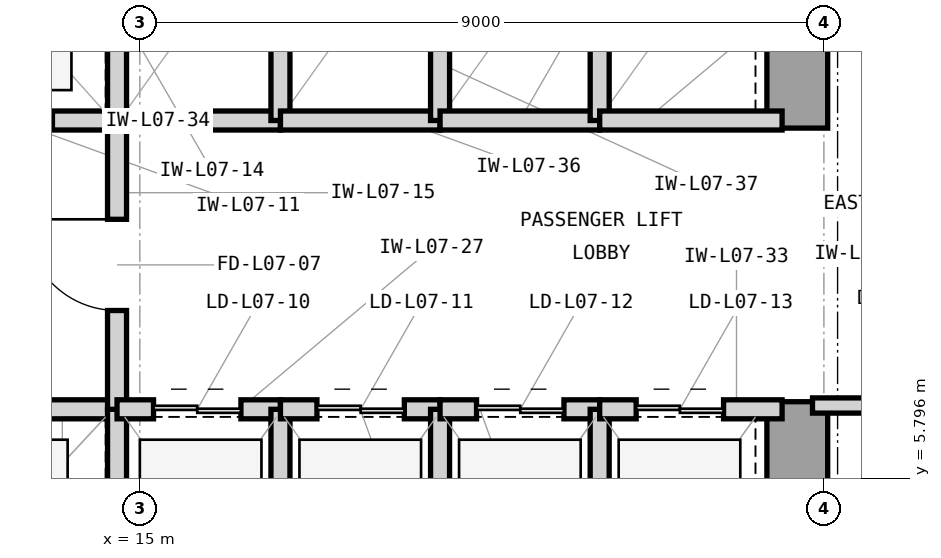
"""IFC4 building model, lengths in metres.
Left out: names, types, materials, properties, quantities, classifications, styles, units other than length and angle.
Written with IfcOpenShell. Run it as: python <this file> out.ifc"""

import sys

from ifc_helpers import new_model, si_unit, direction, frame, frame_2d, origin, place, context, subcontext, project, spatial, rectangle, extrude, element, fill, save


model = new_model("IFC4")
c1 = context("Model", 3, precision=1e-05, world=origin(), true_north=direction((0.0, 1.0)))
c2 = subcontext(c1, "Body", "Model", "MODEL_VIEW")
j1 = project(units=[si_unit("LENGTHUNIT", "METRE"), si_unit("PLANEANGLEUNIT", "RADIAN")], contexts=[c1])
p1 = place(None, origin())
s1 = spatial("IfcSite", under=j1, at=p1, CompositionType="ELEMENT")
p2 = place(p1, origin())
s2 = spatial("IfcBuilding", under=s1, at=p2, CompositionType="ELEMENT")
p3 = place(p2, frame((0.0, 0.0, 34.2)))
s3 = spatial("IfcBuildingStorey", under=s2, at=p3, CompositionType="ELEMENT", Elevation=34.2)
p4 = place(p3, frame((23.65, 3.75, 0.0), z_axis=(0.0, 0.0, 1.0), x_axis=(0.0, 1.0, 0.0)))
e1 = element("IfcWall", 1, at=p4, inside=s3, PredefinedType="SHEAR", context=c2, shape_type="SweptSolid", body=[
    extrude(rectangle(XDim=3.05, YDim=0.8, at=frame_2d((1.525, 0.0))), origin(), (0.0, 0.0, 1.0), 4.2),
])
p5 = place(p3, frame((23.65, 10.4, 0.0), z_axis=(0.0, 0.0, 1.0), x_axis=(0.0, 1.0, 0.0)))
e2 = element("IfcWall", 2, at=p5, inside=s3, PredefinedType="SHEAR", context=c2, shape_type="SweptSolid", body=[
    extrude(rectangle(XDim=3.2, YDim=0.8, at=frame_2d((1.6, 0.0))), origin(), (0.0, 0.0, 1.0), 4.2),
])
p6 = place(p3, frame((11.82, 6.7, 0.0), z_axis=(0.0, 0.0, 1.0), x_axis=(1.0, 0.0, 0.0)))
e3 = element("IfcWall", 3, at=p6, inside=s3, PredefinedType="PARTITIONING", context=c2, shape_type="SweptSolid", body=[
    extrude(rectangle(XDim=2.88, YDim=0.25, at=frame_2d((1.44, 0.0))), origin(), (0.0, 0.0, 1.0), 3.426),
])
p7 = place(p6, frame((0.85, 0.0, 0.0)))
e4 = element("IfcOpeningElement", 4, at=p7, cuts=e3, PredefinedType="OPENING", context=c2, shape_type="SweptSolid", body=[
    extrude(rectangle(XDim=1.1, YDim=2.25, at=frame_2d((0.55, 1.125))), frame((0.0, 0.135, 0.0), z_axis=(0.0, -1.0, 0.0), x_axis=(1.0, 0.0, 0.0)), (0.0, 0.0, 1.0), 0.27),
])
p8 = place(p3, frame((14.7, 3.35, 0.0), z_axis=(0.0, 0.0, 1.0), x_axis=(0.0, 1.0, 0.0)))
e5 = element("IfcWall", 5, at=p8, inside=s3, PredefinedType="PARTITIONING", context=c2, shape_type="SweptSolid", body=[
    extrude(rectangle(XDim=3.35, YDim=0.25, at=frame_2d((1.675, 0.0))), origin(), (0.0, 0.0, 1.0), 3.97),
])
p9 = place(p3, frame((11.95, 10.5, 0.0), z_axis=(0.0, 0.0, 1.0), x_axis=(1.0, 0.0, 0.0)))
e6 = element("IfcWall", 6, at=p9, inside=s3, PredefinedType="PARTITIONING", context=c2, shape_type="SweptSolid", body=[
    extrude(rectangle(XDim=2.75, YDim=0.25, at=frame_2d((1.375, 0.0))), origin(), (0.0, 0.0, 1.0), 3.426),
])
p10 = place(p9, frame((0.8, 0.0, 0.0)))
e7 = element("IfcOpeningElement", 7, at=p10, cuts=e6, PredefinedType="OPENING", context=c2, shape_type="SweptSolid", body=[
    extrude(rectangle(XDim=1.1, YDim=2.25, at=frame_2d((0.55, 1.125))), frame((0.0, 0.135, 0.0), z_axis=(0.0, -1.0, 0.0), x_axis=(1.0, 0.0, 0.0)), (0.0, 0.0, 1.0), 0.27),
])
p11 = place(p3, frame((14.7, 10.5, 0.0), z_axis=(0.0, 0.0, 1.0), x_axis=(0.0, 1.0, 0.0)))
e8 = element("IfcWall", 8, at=p11, inside=s3, PredefinedType="PARTITIONING", context=c2, shape_type="SweptSolid", body=[
    extrude(rectangle(XDim=3.0, YDim=0.25, at=frame_2d((1.5, 0.0))), origin(), (0.0, 0.0, 1.0), 3.97),
])
p12 = place(p3, frame((14.7, 6.7, 0.0), z_axis=(0.0, 0.0, 1.0), x_axis=(0.0, 1.0, 0.0)))
e9 = element("IfcWall", 9, at=p12, inside=s3, PredefinedType="PARTITIONING", context=c2, shape_type="SweptSolid", body=[
    extrude(rectangle(XDim=3.8, YDim=0.25, at=frame_2d((1.9, 0.0))), origin(), (0.0, 0.0, 1.0), 3.97),
])
p13 = place(p12, frame((1.3, 0.0, 0.0)))
e10 = element("IfcOpeningElement", 10, at=p13, cuts=e9, PredefinedType="OPENING", context=c2, shape_type="SweptSolid", body=[
    extrude(rectangle(XDim=1.2, YDim=2.2, at=frame_2d((0.6, 1.1))), frame((0.0, 0.135, 0.0), z_axis=(0.0, -1.0, 0.0), x_axis=(1.0, 0.0, 0.0)), (0.0, 0.0, 1.0), 0.27),
])
p14 = place(p3, frame((14.7, 6.7, 0.0), z_axis=(0.0, 0.0, 1.0), x_axis=(1.0, 0.0, 0.0)))
e11 = element("IfcWall", 11, at=p14, inside=s3, PredefinedType="PARTITIONING", context=c2, shape_type="SweptSolid", body=[
    extrude(rectangle(XDim=2.15, YDim=0.25, at=frame_2d((1.075, 0.0))), origin(), (0.0, 0.0, 1.0), 3.426),
])
p15 = place(p14, frame((0.48, 0.0, 0.0)))
e12 = element("IfcOpeningElement", 12, at=p15, cuts=e11, PredefinedType="OPENING", context=c2, shape_type="SweptSolid", body=[
    extrude(rectangle(XDim=1.15, YDim=2.25, at=frame_2d((0.575, 1.125))), frame((0.0, 0.135, 0.0), z_axis=(0.0, -1.0, 0.0), x_axis=(1.0, 0.0, 0.0)), (0.0, 0.0, 1.0), 0.27),
])
p16 = place(p3, frame((16.85, 3.35, 0.0), z_axis=(0.0, 0.0, 1.0), x_axis=(0.0, 1.0, 0.0)))
e13 = element("IfcWall", 13, at=p16, inside=s3, PredefinedType="PARTITIONING", context=c2, shape_type="SweptSolid", body=[
    extrude(rectangle(XDim=3.35, YDim=0.25, at=frame_2d((1.675, 0.0))), origin(), (0.0, 0.0, 1.0), 3.97),
])
p17 = place(p3, frame((16.85, 6.7, 0.0), z_axis=(0.0, 0.0, 1.0), x_axis=(1.0, 0.0, 0.0)))
e14 = element("IfcWall", 14, at=p17, inside=s3, PredefinedType="PARTITIONING", context=c2, shape_type="SweptSolid", body=[
    extrude(rectangle(XDim=2.1, YDim=0.25, at=frame_2d((1.05, 0.0))), origin(), (0.0, 0.0, 1.0), 3.426),
])
p18 = place(p17, frame((0.48, 0.0, 0.0)))
e15 = element("IfcOpeningElement", 15, at=p18, cuts=e14, PredefinedType="OPENING", context=c2, shape_type="SweptSolid", body=[
    extrude(rectangle(XDim=1.15, YDim=2.25, at=frame_2d((0.575, 1.125))), frame((0.0, 0.135, 0.0), z_axis=(0.0, -1.0, 0.0), x_axis=(1.0, 0.0, 0.0)), (0.0, 0.0, 1.0), 0.27),
])
p19 = place(p3, frame((18.95, 3.35, 0.0), z_axis=(0.0, 0.0, 1.0), x_axis=(0.0, 1.0, 0.0)))
e16 = element("IfcWall", 16, at=p19, inside=s3, PredefinedType="PARTITIONING", context=c2, shape_type="SweptSolid", body=[
    extrude(rectangle(XDim=3.35, YDim=0.25, at=frame_2d((1.675, 0.0))), origin(), (0.0, 0.0, 1.0), 3.97),
])
p20 = place(p3, frame((18.95, 6.7, 0.0), z_axis=(0.0, 0.0, 1.0), x_axis=(1.0, 0.0, 0.0)))
e17 = element("IfcWall", 17, at=p20, inside=s3, PredefinedType="PARTITIONING", context=c2, shape_type="SweptSolid", body=[
    extrude(rectangle(XDim=2.1, YDim=0.25, at=frame_2d((1.05, 0.0))), origin(), (0.0, 0.0, 1.0), 3.426),
])
p21 = place(p20, frame((0.48, 0.0, 0.0)))
e18 = element("IfcOpeningElement", 18, at=p21, cuts=e17, PredefinedType="OPENING", context=c2, shape_type="SweptSolid", body=[
    extrude(rectangle(XDim=1.15, YDim=2.25, at=frame_2d((0.575, 1.125))), frame((0.0, 0.135, 0.0), z_axis=(0.0, -1.0, 0.0), x_axis=(1.0, 0.0, 0.0)), (0.0, 0.0, 1.0), 0.27),
])
p22 = place(p3, frame((21.05, 3.35, 0.0), z_axis=(0.0, 0.0, 1.0), x_axis=(0.0, 1.0, 0.0)))
e19 = element("IfcWall", 19, at=p22, inside=s3, PredefinedType="PARTITIONING", context=c2, shape_type="SweptSolid", body=[
    extrude(rectangle(XDim=3.35, YDim=0.25, at=frame_2d((1.675, 0.0))), origin(), (0.0, 0.0, 1.0), 3.97),
])
p23 = place(p3, frame((21.05, 6.7, 0.0), z_axis=(0.0, 0.0, 1.0), x_axis=(1.0, 0.0, 0.0)))
e20 = element("IfcWall", 20, at=p23, inside=s3, PredefinedType="PARTITIONING", context=c2, shape_type="SweptSolid", body=[
    extrude(rectangle(XDim=2.4, YDim=0.25, at=frame_2d((1.2, 0.0))), origin(), (0.0, 0.0, 1.0), 3.426),
])
p24 = place(p23, frame((0.48, 0.0, 0.0)))
e21 = element("IfcOpeningElement", 21, at=p24, cuts=e20, PredefinedType="OPENING", context=c2, shape_type="SweptSolid", body=[
    extrude(rectangle(XDim=1.15, YDim=2.25, at=frame_2d((0.575, 1.125))), frame((0.0, 0.135, 0.0), z_axis=(0.0, -1.0, 0.0), x_axis=(1.0, 0.0, 0.0)), (0.0, 0.0, 1.0), 0.27),
])
p25 = place(p3, frame((14.7, 10.5, 0.0), z_axis=(0.0, 0.0, 1.0), x_axis=(1.0, 0.0, 0.0)))
e22 = element("IfcWall", 22, at=p25, inside=s3, PredefinedType="PARTITIONING", context=c2, shape_type="SweptSolid", body=[
    extrude(rectangle(XDim=2.15, YDim=0.25, at=frame_2d((1.075, 0.0))), origin(), (0.0, 0.0, 1.0), 3.426),
])
p26 = place(p3, frame((16.85, 10.5, 0.0), z_axis=(0.0, 0.0, 1.0), x_axis=(0.0, 1.0, 0.0)))
e23 = element("IfcWall", 23, at=p26, inside=s3, PredefinedType="PARTITIONING", context=c2, shape_type="SweptSolid", body=[
    extrude(rectangle(XDim=3.0, YDim=0.25, at=frame_2d((1.5, 0.0))), origin(), (0.0, 0.0, 1.0), 3.97),
])
p27 = place(p3, frame((16.85, 10.5, 0.0), z_axis=(0.0, 0.0, 1.0), x_axis=(1.0, 0.0, 0.0)))
e24 = element("IfcWall", 24, at=p27, inside=s3, PredefinedType="PARTITIONING", context=c2, shape_type="SweptSolid", body=[
    extrude(rectangle(XDim=2.1, YDim=0.25, at=frame_2d((1.05, 0.0))), origin(), (0.0, 0.0, 1.0), 3.426),
])
p28 = place(p3, frame((18.95, 10.5, 0.0), z_axis=(0.0, 0.0, 1.0), x_axis=(0.0, 1.0, 0.0)))
e25 = element("IfcWall", 25, at=p28, inside=s3, PredefinedType="PARTITIONING", context=c2, shape_type="SweptSolid", body=[
    extrude(rectangle(XDim=3.0, YDim=0.25, at=frame_2d((1.5, 0.0))), origin(), (0.0, 0.0, 1.0), 3.97),
])
p29 = place(p3, frame((18.95, 10.5, 0.0), z_axis=(0.0, 0.0, 1.0), x_axis=(1.0, 0.0, 0.0)))
e26 = element("IfcWall", 26, at=p29, inside=s3, PredefinedType="PARTITIONING", context=c2, shape_type="SweptSolid", body=[
    extrude(rectangle(XDim=2.1, YDim=0.25, at=frame_2d((1.05, 0.0))), origin(), (0.0, 0.0, 1.0), 3.426),
])
p30 = place(p3, frame((21.05, 10.5, 0.0), z_axis=(0.0, 0.0, 1.0), x_axis=(0.0, 1.0, 0.0)))
e27 = element("IfcWall", 27, at=p30, inside=s3, PredefinedType="PARTITIONING", context=c2, shape_type="SweptSolid", body=[
    extrude(rectangle(XDim=3.0, YDim=0.25, at=frame_2d((1.5, 0.0))), origin(), (0.0, 0.0, 1.0), 3.97),
])
p31 = place(p3, frame((21.05, 10.5, 0.0), z_axis=(0.0, 0.0, 1.0), x_axis=(1.0, 0.0, 0.0)))
e28 = element("IfcWall", 28, at=p31, inside=s3, PredefinedType="PARTITIONING", context=c2, shape_type="SweptSolid", body=[
    extrude(rectangle(XDim=2.4, YDim=0.25, at=frame_2d((1.2, 0.0))), origin(), (0.0, 0.0, 1.0), 3.426),
])
p32 = place(p3, frame((23.85, 6.75, 0.0), z_axis=(0.0, 0.0, 1.0), x_axis=(1.0, 0.0, 0.0)))
e29 = element("IfcWall", 29, at=p32, inside=s3, PredefinedType="PARTITIONING", context=c2, shape_type="SweptSolid", body=[
    extrude(rectangle(XDim=2.85, YDim=0.2, at=frame_2d((1.425, 0.0))), origin(), (0.0, 0.0, 1.0), 3.97),
])
p33 = place(p32, frame((0.7, 0.0, 0.0)))
e30 = element("IfcOpeningElement", 30, at=p33, cuts=e29, PredefinedType="OPENING", context=c2, shape_type="SweptSolid", body=[
    extrude(rectangle(XDim=1.0, YDim=2.15, at=frame_2d((0.5, 1.075))), frame((0.0, 0.11, 0.0), z_axis=(0.0, -1.0, 0.0), x_axis=(1.0, 0.0, 0.0)), (0.0, 0.0, 1.0), 0.22),
])
p34 = place(p13, origin())
e31 = element("IfcDoor", 31, at=p34, inside=s3, OperationType="SINGLE_SWING_RIGHT", PredefinedType="DOOR", context=c2, shape_type="SweptSolid", body=[
    extrude(rectangle(XDim=1.2, YDim=2.2, at=frame_2d((0.6, 1.1))), frame((0.0, 0.025, 0.0), z_axis=(0.0, -1.0, 0.0), x_axis=(1.0, 0.0, 0.0)), (0.0, 0.0, 1.0), 0.05),
])
fill(e10, e31)
p35 = place(p15, origin())
e32 = element("IfcDoor", 32, at=p35, inside=s3, OperationType="DOUBLE_DOOR_SLIDING", PredefinedType="DOOR", context=c2, shape_type="SweptSolid", body=[
    extrude(rectangle(XDim=1.15, YDim=2.25, at=frame_2d((0.575, 1.125))), frame((0.0, 0.025, 0.0), z_axis=(0.0, -1.0, 0.0), x_axis=(1.0, 0.0, 0.0)), (0.0, 0.0, 1.0), 0.05),
])
fill(e12, e32)
p36 = place(p18, origin())
e33 = element("IfcDoor", 33, at=p36, inside=s3, OperationType="DOUBLE_DOOR_SLIDING", PredefinedType="DOOR", context=c2, shape_type="SweptSolid", body=[
    extrude(rectangle(XDim=1.15, YDim=2.25, at=frame_2d((0.575, 1.125))), frame((0.0, 0.025, 0.0), z_axis=(0.0, -1.0, 0.0), x_axis=(1.0, 0.0, 0.0)), (0.0, 0.0, 1.0), 0.05),
])
fill(e15, e33)
p37 = place(p21, origin())
e34 = element("IfcDoor", 34, at=p37, inside=s3, OperationType="DOUBLE_DOOR_SLIDING", PredefinedType="DOOR", context=c2, shape_type="SweptSolid", body=[
    extrude(rectangle(XDim=1.15, YDim=2.25, at=frame_2d((0.575, 1.125))), frame((0.0, 0.025, 0.0), z_axis=(0.0, -1.0, 0.0), x_axis=(1.0, 0.0, 0.0)), (0.0, 0.0, 1.0), 0.05),
])
fill(e18, e34)
p38 = place(p24, origin())
e35 = element("IfcDoor", 35, at=p38, inside=s3, OperationType="DOUBLE_DOOR_SLIDING", PredefinedType="DOOR", context=c2, shape_type="SweptSolid", body=[
    extrude(rectangle(XDim=1.15, YDim=2.25, at=frame_2d((0.575, 1.125))), frame((0.0, 0.025, 0.0), z_axis=(0.0, -1.0, 0.0), x_axis=(1.0, 0.0, 0.0)), (0.0, 0.0, 1.0), 0.05),
])
fill(e21, e35)
save(model, sys.argv[1])
